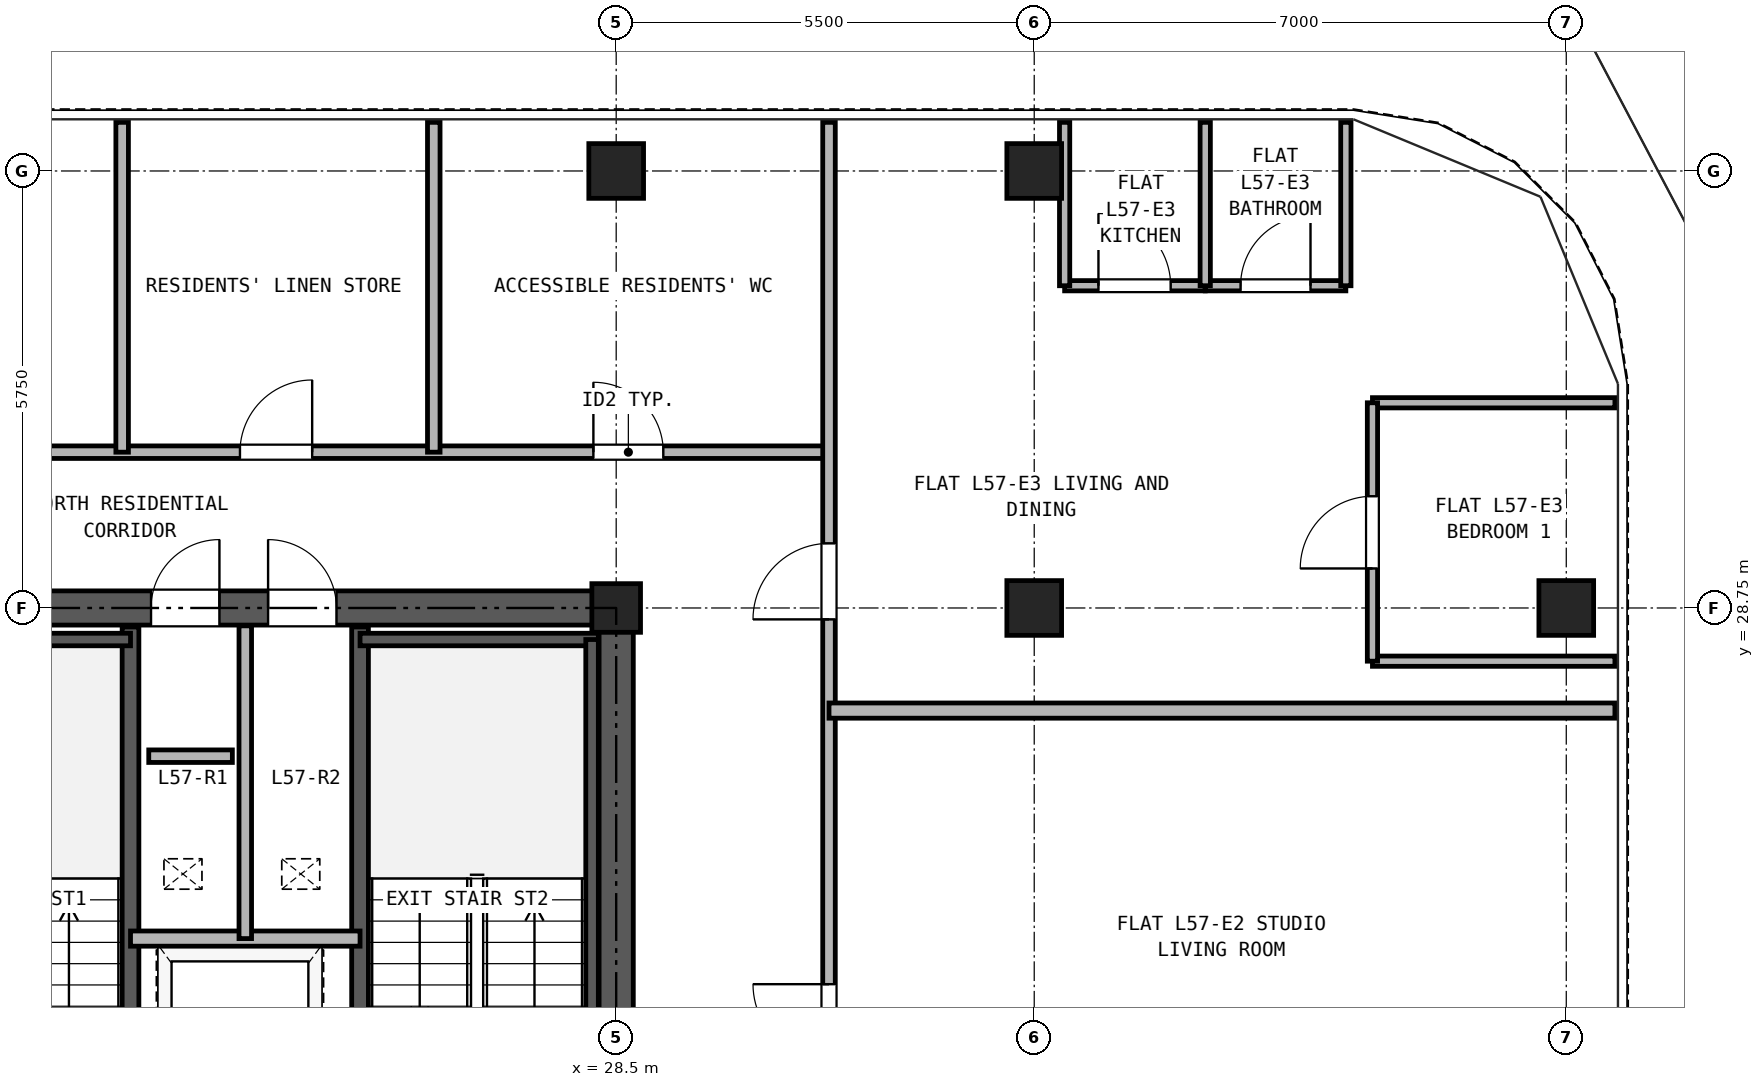
"""IFC4 building model, lengths in metres.
Left out: names, types, materials, properties, quantities, classifications, styles, units other than length and angle.
Written with IfcOpenShell. Run it as: python <this file> out.ifc"""

import sys

from ifc_helpers import new_model, si_unit, direction, frame, frame_2d, origin, origin_2d, place, context, subcontext, project, spatial, rectangle, hollow_rectangle, extrude, source, transform, mapped, element, fill, save


model = new_model("IFC4")
c1 = context("Model", 3, precision=1e-05, world=origin(), true_north=direction((0.0, 1.0)))
c2 = subcontext(c1, "Body", "Model", "MODEL_VIEW")
j1 = project(units=[si_unit("LENGTHUNIT", "METRE"), si_unit("PLANEANGLEUNIT", "RADIAN")], contexts=[c1])
p1 = place(None, origin())
s1 = spatial("IfcSite", under=j1, at=p1, CompositionType="ELEMENT")
p2 = place(p1, origin())
s2 = spatial("IfcBuilding", under=s1, at=p2, CompositionType="ELEMENT")
p3 = place(p2, frame((0.0, 0.0, 202.8)))
s3 = spatial("IfcBuildingStorey", under=s2, at=p3, CompositionType="ELEMENT", Elevation=202.8)
m1 = source(origin(), c2, "Body", "SweptSolid", [
    extrude(hollow_rectangle(XDim=0.72, YDim=0.72, WallThickness=0.04, at=origin_2d()), origin(), (0.0, 0.0, 1.0), 2.95),
])
for number, where, z_axis, x_axis in (
    (1, (28.5, 34.5, 0.0), (0.0, 0.0, 1.0), (1.0, 0.0, 0.0)),
    (2, (34.0, 34.5, 0.0), (0.0, 0.0, 1.0), (1.0, 0.0, 0.0)),
    (3, (41.0, 28.75, 0.0), (0.0, 0.0, 1.0), (1.0, 0.0, 0.0)),
):
    element("IfcColumn", number, at=place(p3, frame(where, z_axis=z_axis, x_axis=x_axis)), inside=s3, PredefinedType="COLUMN", context=c2, shape_type="MappedRepresentation", body=[
        mapped(m1, transform((0.0, 0.0, 0.0), x_axis=(1.0, 0.0, 0.0), y_axis=(0.0, 1.0, 0.0), z_axis=(0.0, 0.0, 1.0), scale=1.0)),
    ])
m2 = source(origin(), c2, "Body", "SweptSolid", [
    extrude(hollow_rectangle(XDim=0.64, YDim=0.64, WallThickness=0.035, at=origin_2d()), origin(), (0.0, 0.0, 1.0), 2.95),
])
p4 = place(p3, frame((28.5, 28.75, 0.0), z_axis=(0.0, 0.0, 1.0), x_axis=(1.0, 0.0, 0.0)))
e4 = element("IfcColumn", 4, at=p4, inside=s3, PredefinedType="COLUMN", context=c2, shape_type="MappedRepresentation", body=[
    mapped(m2, transform((0.0, 0.0, 0.0), x_axis=(1.0, 0.0, 0.0), y_axis=(0.0, 1.0, 0.0), z_axis=(0.0, 0.0, 1.0), scale=1.0)),
])
p5 = place(p3, frame((34.0, 28.75, 0.0), z_axis=(0.0, 0.0, 1.0), x_axis=(1.0, 0.0, 0.0)))
e5 = element("IfcColumn", 5, at=p5, inside=s3, PredefinedType="COLUMN", context=c2, shape_type="MappedRepresentation", body=[
    mapped(m1, transform((0.0, 0.0, 0.0), x_axis=(1.0, 0.0, 0.0), y_axis=(0.0, 1.0, 0.0), z_axis=(0.0, 0.0, 1.0), scale=1.0)),
])
p6 = place(p3, frame((18.275, 28.75, 0.0), z_axis=(0.0, 0.0, 1.0), x_axis=(1.0, 0.0, 0.0)))
e6 = element("IfcWall", 6, at=p6, inside=s3, PredefinedType="SHEAR", context=c2, shape_type="SweptSolid", body=[
    extrude(rectangle(XDim=10.45, YDim=0.45, at=frame_2d((5.225, 0.0))), origin(), (0.0, 0.0, 1.0), 2.95),
])
p7 = place(p6, frame((4.105, 0.0, 0.0)))
e7 = element("IfcOpeningElement", 7, at=p7, cuts=e6, PredefinedType="OPENING", context=c2, shape_type="SweptSolid", body=[
    extrude(rectangle(XDim=0.9, YDim=2.05, at=frame_2d((0.45, 1.025))), frame((0.0, 0.235, 0.0), z_axis=(0.0, -1.0, 0.0), x_axis=(1.0, 0.0, 0.0)), (0.0, 0.0, 1.0), 0.47),
])
p8 = place(p6, frame((5.645, 0.0, 0.0)))
e8 = element("IfcOpeningElement", 8, at=p8, cuts=e6, PredefinedType="OPENING", context=c2, shape_type="SweptSolid", body=[
    extrude(rectangle(XDim=0.9, YDim=2.05, at=frame_2d((0.45, 1.025))), frame((0.0, 0.235, 0.0), z_axis=(0.0, -1.0, 0.0), x_axis=(1.0, 0.0, 0.0)), (0.0, 0.0, 1.0), 0.47),
])
p9 = place(p3, frame((28.5, 11.725, 0.0), z_axis=(0.0, 0.0, 1.0), x_axis=(0.0, 1.0, 0.0)))
e9 = element("IfcWall", 9, at=p9, inside=s3, PredefinedType="SHEAR", context=c2, shape_type="SweptSolid", body=[
    extrude(rectangle(XDim=16.8, YDim=0.45, at=frame_2d((8.4, 0.0))), origin(), (0.0, 0.0, 1.0), 2.95),
])
p10 = place(p9, frame((7.425, 0.0, 0.0)))
e10 = element("IfcOpeningElement", 10, at=p10, cuts=e9, PredefinedType="OPENING", context=c2, shape_type="SweptSolid", body=[
    extrude(rectangle(XDim=1.15, YDim=2.2, at=frame_2d((0.575, 1.1))), frame((0.0, 0.235, 0.0), z_axis=(0.0, -1.0, 0.0), x_axis=(1.0, 0.0, 0.0)), (0.0, 0.0, 1.0), 0.47),
])
for number, where, z_axis, x_axis in (
    (11, (22.11, 21.39, 0.0), (0.0, 0.0, 1.0), (0.0, 1.0, 0.0)),
    (12, (25.13, 21.39, 0.0), (0.0, 0.0, 1.0), (0.0, 1.0, 0.0)),
):
    element("IfcWall", number, at=place(p3, frame(where, z_axis=z_axis, x_axis=x_axis)), inside=s3, PredefinedType="SOLIDWALL", context=c2, shape_type="SweptSolid", body=[
        extrude(rectangle(XDim=7.11, YDim=0.22, at=frame_2d((3.555, 0.0))), origin(), (0.0, 0.0, 1.0), 2.95),
    ])
p11 = place(p3, frame((18.735, 28.335, 0.0), z_axis=(0.0, 0.0, 1.0), x_axis=(1.0, 0.0, 0.0)))
e13 = element("IfcWall", 13, at=p11, inside=s3, PredefinedType="PARTITIONING", context=c2, shape_type="SweptSolid", body=[
    extrude(rectangle(XDim=3.375, YDim=0.165, at=frame_2d((1.688, 0.0))), origin(), (0.0, 0.0, 1.0), 2.95),
])
p12 = place(p3, frame((25.13, 28.335, 0.0), z_axis=(0.0, 0.0, 1.0), x_axis=(1.0, 0.0, 0.0)))
e14 = element("IfcWall", 14, at=p12, inside=s3, PredefinedType="PARTITIONING", context=c2, shape_type="SweptSolid", body=[
    extrude(rectangle(XDim=3.135, YDim=0.165, at=frame_2d((1.567, 0.0))), origin(), (0.0, 0.0, 1.0), 2.95),
])
p13 = place(p3, frame((28.183, 21.39, 0.0), z_axis=(0.0, 0.0, 1.0), x_axis=(0.0, 1.0, 0.0)))
e15 = element("IfcWall", 15, at=p13, inside=s3, PredefinedType="PARTITIONING", context=c2, shape_type="SweptSolid", body=[
    extrude(rectangle(XDim=6.945, YDim=0.165, at=frame_2d((3.473, 0.0))), origin(), (0.0, 0.0, 1.0), 2.95),
])
p14 = place(p3, frame((22.11, 24.4, 0.0), z_axis=(0.0, 0.0, 1.0), x_axis=(1.0, 0.0, 0.0)))
e16 = element("IfcWall", 16, at=p14, inside=s3, PredefinedType="PARTITIONING", context=c2, shape_type="SweptSolid", body=[
    extrude(rectangle(XDim=3.02, YDim=0.2, at=frame_2d((1.51, 0.0))), origin(), (0.0, 0.0, 1.0), 2.95),
])
p15 = place(p3, frame((23.62, 24.4, 0.0), z_axis=(0.0, 0.0, 1.0), x_axis=(0.0, 1.0, 0.0)))
e17 = element("IfcWall", 17, at=p15, inside=s3, PredefinedType="PARTITIONING", context=c2, shape_type="SweptSolid", body=[
    extrude(rectangle(XDim=4.115, YDim=0.165, at=frame_2d((2.058, 0.0))), origin(), (0.0, 0.0, 1.0), 2.95),
])
p16 = place(p3, frame((15.7, 30.8, 0.0), z_axis=(0.0, 0.0, 1.0), x_axis=(1.0, 0.0, 0.0)))
e18 = element("IfcWall", 18, at=p16, inside=s3, PredefinedType="PARTITIONING", context=c2, shape_type="SweptSolid", body=[
    extrude(rectangle(XDim=15.6, YDim=0.165, at=frame_2d((7.8, 0.0))), origin(), (0.0, 0.0, 1.0), 2.95),
])
p17 = place(p16, frame((2.65, 0.0, 0.0)))
e19 = element("IfcOpeningElement", 19, at=p17, cuts=e18, PredefinedType="OPENING", context=c2, shape_type="SweptSolid", body=[
    extrude(rectangle(XDim=0.95, YDim=2.15, at=frame_2d((0.475, 1.075))), frame((0.0, 0.093, 0.0), z_axis=(0.0, -1.0, 0.0), x_axis=(1.0, 0.0, 0.0)), (0.0, 0.0, 1.0), 0.185),
])
p18 = place(p16, frame((7.85, 0.0, 0.0)))
e20 = element("IfcOpeningElement", 20, at=p18, cuts=e18, PredefinedType="OPENING", context=c2, shape_type="SweptSolid", body=[
    extrude(rectangle(XDim=0.95, YDim=2.15, at=frame_2d((0.475, 1.075))), frame((0.0, 0.093, 0.0), z_axis=(0.0, -1.0, 0.0), x_axis=(1.0, 0.0, 0.0)), (0.0, 0.0, 1.0), 0.185),
])
p19 = place(p16, frame((12.5, 0.0, 0.0)))
e21 = element("IfcOpeningElement", 21, at=p19, cuts=e18, PredefinedType="OPENING", context=c2, shape_type="SweptSolid", body=[
    extrude(rectangle(XDim=0.92, YDim=2.1, at=frame_2d((0.46, 1.05))), frame((0.0, 0.093, 0.0), z_axis=(0.0, -1.0, 0.0), x_axis=(1.0, 0.0, 0.0)), (0.0, 0.0, 1.0), 0.185),
])
p20 = place(p3, frame((31.3, 10.85, 0.0), z_axis=(0.0, 0.0, 1.0), x_axis=(0.0, 1.0, 0.0)))
e22 = element("IfcWall", 22, at=p20, inside=s3, PredefinedType="PARTITIONING", context=c2, shape_type="SweptSolid", body=[
    extrude(rectangle(XDim=24.29, YDim=0.165, at=frame_2d((12.145, 0.0))), origin(), (0.0, 0.0, 1.0), 2.95),
])
p21 = place(p20, frame((3.675, 0.0, 0.0)))
e23 = element("IfcOpeningElement", 23, at=p21, cuts=e22, PredefinedType="OPENING", context=c2, shape_type="SweptSolid", body=[
    extrude(rectangle(XDim=1.0, YDim=2.15, at=frame_2d((0.5, 1.075))), frame((0.0, 0.093, 0.0), z_axis=(0.0, -1.0, 0.0), x_axis=(1.0, 0.0, 0.0)), (0.0, 0.0, 1.0), 0.185),
])
p22 = place(p20, frame((11.95, 0.0, 0.0)))
e24 = element("IfcOpeningElement", 24, at=p22, cuts=e22, PredefinedType="OPENING", context=c2, shape_type="SweptSolid", body=[
    extrude(rectangle(XDim=1.0, YDim=2.15, at=frame_2d((0.5, 1.075))), frame((0.0, 0.093, 0.0), z_axis=(0.0, -1.0, 0.0), x_axis=(1.0, 0.0, 0.0)), (0.0, 0.0, 1.0), 0.185),
])
p23 = place(p20, frame((17.75, 0.0, 0.0)))
e25 = element("IfcOpeningElement", 25, at=p23, cuts=e22, PredefinedType="OPENING", context=c2, shape_type="SweptSolid", body=[
    extrude(rectangle(XDim=1.0, YDim=2.15, at=frame_2d((0.5, 1.075))), frame((0.0, 0.093, 0.0), z_axis=(0.0, -1.0, 0.0), x_axis=(1.0, 0.0, 0.0)), (0.0, 0.0, 1.0), 0.185),
])
p24 = place(p3, frame((31.3, 27.4, 0.0), z_axis=(0.0, 0.0, 1.0), x_axis=(1.0, 0.0, 0.0)))
e26 = element("IfcWall", 26, at=p24, inside=s3, PredefinedType="PARTITIONING", context=c2, shape_type="SweptSolid", body=[
    extrude(rectangle(XDim=10.34, YDim=0.2, at=frame_2d((5.17, 0.0))), origin(), (0.0, 0.0, 1.0), 2.95),
])
p25 = place(p3, frame((34.4, 32.99, 0.0), z_axis=(0.0, 0.0, 1.0), x_axis=(1.0, 0.0, 0.0)))
e27 = element("IfcWall", 27, at=p25, inside=s3, PredefinedType="PARTITIONING", context=c2, shape_type="SweptSolid", body=[
    extrude(rectangle(XDim=1.85, YDim=0.135, at=frame_2d((0.925, 0.0))), origin(), (0.0, 0.0, 1.0), 2.95),
])
p26 = place(p25, frame((0.445, 0.0, 0.0)))
e28 = element("IfcOpeningElement", 28, at=p26, cuts=e27, PredefinedType="OPENING", context=c2, shape_type="SweptSolid", body=[
    extrude(rectangle(XDim=0.95, YDim=2.15, at=frame_2d((0.475, 1.075))), frame((0.0, 0.077, 0.0), z_axis=(0.0, -1.0, 0.0), x_axis=(1.0, 0.0, 0.0)), (0.0, 0.0, 1.0), 0.155),
])
p27 = place(p3, frame((36.25, 32.99, 0.0), z_axis=(0.0, 0.0, 1.0), x_axis=(1.0, 0.0, 0.0)))
e29 = element("IfcWall", 29, at=p27, inside=s3, PredefinedType="PARTITIONING", context=c2, shape_type="SweptSolid", body=[
    extrude(rectangle(XDim=1.85, YDim=0.135, at=frame_2d((0.925, 0.0))), origin(), (0.0, 0.0, 1.0), 2.95),
])
p28 = place(p27, frame((0.465, 0.0, 0.0)))
e30 = element("IfcOpeningElement", 30, at=p28, cuts=e29, PredefinedType="OPENING", context=c2, shape_type="SweptSolid", body=[
    extrude(rectangle(XDim=0.92, YDim=2.1, at=frame_2d((0.46, 1.05))), frame((0.0, 0.077, 0.0), z_axis=(0.0, -1.0, 0.0), x_axis=(1.0, 0.0, 0.0)), (0.0, 0.0, 1.0), 0.155),
])
for number, where, z_axis, x_axis in (
    (31, (34.4, 32.99, 0.0), (0.0, 0.0, 1.0), (0.0, 1.0, 0.0)),
    (32, (36.25, 32.99, 0.0), (0.0, 0.0, 1.0), (0.0, 1.0, 0.0)),
    (33, (38.1, 32.99, 0.0), (0.0, 0.0, 1.0), (0.0, 1.0, 0.0)),
):
    element("IfcWall", number, at=place(p3, frame(where, z_axis=z_axis, x_axis=x_axis)), inside=s3, PredefinedType="PARTITIONING", context=c2, shape_type="SweptSolid", body=[
        extrude(rectangle(XDim=2.15, YDim=0.135, at=frame_2d((1.075, 0.0))), origin(), (0.0, 0.0, 1.0), 2.95),
    ])
for number, where, z_axis, x_axis in (
    (34, (38.45, 28.05, 0.0), (0.0, 0.0, 1.0), (1.0, 0.0, 0.0)),
    (35, (38.45, 31.45, 0.0), (0.0, 0.0, 1.0), (1.0, 0.0, 0.0)),
):
    element("IfcWall", number, at=place(p3, frame(where, z_axis=z_axis, x_axis=x_axis)), inside=s3, PredefinedType="PARTITIONING", context=c2, shape_type="SweptSolid", body=[
        extrude(rectangle(XDim=3.19, YDim=0.135, at=frame_2d((1.595, 0.0))), origin(), (0.0, 0.0, 1.0), 2.95),
    ])
p29 = place(p3, frame((38.45, 28.05, 0.0), z_axis=(0.0, 0.0, 1.0), x_axis=(0.0, 1.0, 0.0)))
e36 = element("IfcWall", 36, at=p29, inside=s3, PredefinedType="PARTITIONING", context=c2, shape_type="SweptSolid", body=[
    extrude(rectangle(XDim=3.4, YDim=0.135, at=frame_2d((1.7, 0.0))), origin(), (0.0, 0.0, 1.0), 2.95),
])
p30 = place(p29, frame((1.22, 0.0, 0.0)))
e37 = element("IfcOpeningElement", 37, at=p30, cuts=e36, PredefinedType="OPENING", context=c2, shape_type="SweptSolid", body=[
    extrude(rectangle(XDim=0.95, YDim=2.15, at=frame_2d((0.475, 1.075))), frame((0.0, 0.077, 0.0), z_axis=(0.0, -1.0, 0.0), x_axis=(1.0, 0.0, 0.0)), (0.0, 0.0, 1.0), 0.155),
])
for number, where, z_axis, x_axis in (
    (38, (22.0, 30.8, 0.0), (0.0, 0.0, 1.0), (0.0, 1.0, 0.0)),
    (39, (26.1, 30.8, 0.0), (0.0, 0.0, 1.0), (0.0, 1.0, 0.0)),
):
    element("IfcWall", number, at=place(p3, frame(where, z_axis=z_axis, x_axis=x_axis)), inside=s3, PredefinedType="PARTITIONING", context=c2, shape_type="SweptSolid", body=[
        extrude(rectangle(XDim=4.34, YDim=0.165, at=frame_2d((2.17, 0.0))), origin(), (0.0, 0.0, 1.0), 2.95),
    ])
p31 = place(p3, frame((22.35, 26.8, 0.0), z_axis=(0.0, 0.0, 1.0), x_axis=(1.0, 0.0, 0.0)))
e40 = element("IfcWall", 40, at=p31, inside=s3, PredefinedType="PARTITIONING", context=c2, shape_type="SweptSolid", body=[
    extrude(rectangle(XDim=1.1, YDim=0.165, at=frame_2d((0.55, 0.0))), origin(), (0.0, 0.0, 1.0), 2.95),
])
p32 = place(p7, origin())
e41 = element("IfcDoor", 41, at=p32, inside=s3, OperationType="SINGLE_SWING_RIGHT", PredefinedType="DOOR", context=c2, shape_type="SweptSolid", body=[
    extrude(rectangle(XDim=0.9, YDim=2.05, at=frame_2d((0.45, 1.025))), frame((0.0, 0.025, 0.0), z_axis=(0.0, -1.0, 0.0), x_axis=(1.0, 0.0, 0.0)), (0.0, 0.0, 1.0), 0.05),
])
fill(e7, e41)
p33 = place(p8, origin())
e42 = element("IfcDoor", 42, at=p33, inside=s3, OperationType="SINGLE_SWING_LEFT", PredefinedType="DOOR", context=c2, shape_type="SweptSolid", body=[
    extrude(rectangle(XDim=0.9, YDim=2.05, at=frame_2d((0.45, 1.025))), frame((0.0, 0.025, 0.0), z_axis=(0.0, -1.0, 0.0), x_axis=(1.0, 0.0, 0.0)), (0.0, 0.0, 1.0), 0.05),
])
fill(e8, e42)
p34 = place(p22, frame((1.0, 0.0, 0.0), z_axis=(0.0, 0.0, 1.0), x_axis=(-1.0, 0.0, 0.0)))
e43 = element("IfcDoor", 43, at=p34, inside=s3, OperationType="SINGLE_SWING_RIGHT", PredefinedType="DOOR", context=c2, shape_type="SweptSolid", body=[
    extrude(rectangle(XDim=1.0, YDim=2.15, at=frame_2d((0.5, 1.075))), frame((0.0, 0.025, 0.0), z_axis=(0.0, -1.0, 0.0), x_axis=(1.0, 0.0, 0.0)), (0.0, 0.0, 1.0), 0.05),
])
fill(e24, e43)
p35 = place(p26, frame((0.95, 0.0, 0.0), z_axis=(0.0, 0.0, 1.0), x_axis=(-1.0, 0.0, 0.0)))
e44 = element("IfcDoor", 44, at=p35, inside=s3, OperationType="SINGLE_SWING_LEFT", PredefinedType="DOOR", context=c2, shape_type="SweptSolid", body=[
    extrude(rectangle(XDim=0.95, YDim=2.15, at=frame_2d((0.475, 1.075))), frame((0.0, 0.025, 0.0), z_axis=(0.0, -1.0, 0.0), x_axis=(1.0, 0.0, 0.0)), (0.0, 0.0, 1.0), 0.05),
])
fill(e28, e44)
p36 = place(p28, frame((0.92, 0.0, 0.0), z_axis=(0.0, 0.0, 1.0), x_axis=(-1.0, 0.0, 0.0)))
e45 = element("IfcDoor", 45, at=p36, inside=s3, OperationType="SINGLE_SWING_RIGHT", PredefinedType="DOOR", context=c2, shape_type="SweptSolid", body=[
    extrude(rectangle(XDim=0.92, YDim=2.1, at=frame_2d((0.46, 1.05))), frame((0.0, 0.025, 0.0), z_axis=(0.0, -1.0, 0.0), x_axis=(1.0, 0.0, 0.0)), (0.0, 0.0, 1.0), 0.05),
])
fill(e30, e45)
p37 = place(p30, frame((0.95, 0.0, 0.0), z_axis=(0.0, 0.0, 1.0), x_axis=(-1.0, 0.0, 0.0)))
e46 = element("IfcDoor", 46, at=p37, inside=s3, OperationType="SINGLE_SWING_LEFT", PredefinedType="DOOR", context=c2, shape_type="SweptSolid", body=[
    extrude(rectangle(XDim=0.95, YDim=2.15, at=frame_2d((0.475, 1.075))), frame((0.0, 0.025, 0.0), z_axis=(0.0, -1.0, 0.0), x_axis=(1.0, 0.0, 0.0)), (0.0, 0.0, 1.0), 0.05),
])
fill(e37, e46)
p38 = place(p23, frame((1.0, 0.0, 0.0), z_axis=(0.0, 0.0, 1.0), x_axis=(-1.0, 0.0, 0.0)))
e47 = element("IfcDoor", 47, at=p38, inside=s3, OperationType="SINGLE_SWING_LEFT", PredefinedType="DOOR", context=c2, shape_type="SweptSolid", body=[
    extrude(rectangle(XDim=1.0, YDim=2.15, at=frame_2d((0.5, 1.075))), frame((0.0, 0.025, 0.0), z_axis=(0.0, -1.0, 0.0), x_axis=(1.0, 0.0, 0.0)), (0.0, 0.0, 1.0), 0.05),
])
fill(e25, e47)
p39 = place(p18, origin())
e48 = element("IfcDoor", 48, at=p39, inside=s3, OperationType="SINGLE_SWING_RIGHT", PredefinedType="DOOR", context=c2, shape_type="SweptSolid", body=[
    extrude(rectangle(XDim=0.95, YDim=2.15, at=frame_2d((0.475, 1.075))), frame((0.0, 0.025, 0.0), z_axis=(0.0, -1.0, 0.0), x_axis=(1.0, 0.0, 0.0)), (0.0, 0.0, 1.0), 0.05),
])
fill(e20, e48)
p40 = place(p19, origin())
e49 = element("IfcDoor", 49, at=p40, inside=s3, OperationType="SINGLE_SWING_LEFT", PredefinedType="DOOR", context=c2, shape_type="SweptSolid", body=[
    extrude(rectangle(XDim=0.92, YDim=2.1, at=frame_2d((0.46, 1.05))), frame((0.0, 0.025, 0.0), z_axis=(0.0, -1.0, 0.0), x_axis=(1.0, 0.0, 0.0)), (0.0, 0.0, 1.0), 0.05),
])
fill(e21, e49)
save(model, sys.argv[1])
